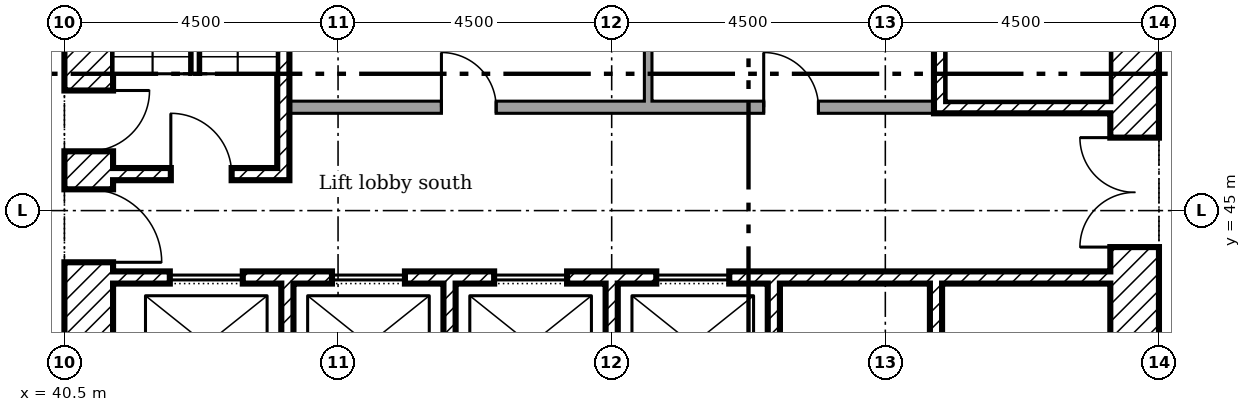
"""IFC4 building model, lengths in metres.
Left out: names, types, materials, properties, quantities, classifications, styles, units other than length and angle.
Written with IfcOpenShell. Run it as: python <this file> out.ifc"""

import sys

from ifc_helpers import new_model, si_unit, direction, frame, frame_2d, origin, place, context, subcontext, project, spatial, rectangle, extrude, element, fill, save


model = new_model("IFC4")
c1 = context("Model", 3, precision=1e-05, world=origin(), true_north=direction((0.0, 1.0)))
c2 = subcontext(c1, "Body", "Model", "MODEL_VIEW")
j1 = project(units=[si_unit("LENGTHUNIT", "METRE"), si_unit("PLANEANGLEUNIT", "RADIAN")], contexts=[c1])
p1 = place(None, origin())
s1 = spatial("IfcSite", under=j1, at=p1, CompositionType="ELEMENT")
p2 = place(p1, origin())
s2 = spatial("IfcBuilding", under=s1, at=p2, CompositionType="ELEMENT")
p3 = place(p2, frame((0.0, 0.0, 47.4)))
s3 = spatial("IfcBuildingStorey", under=s2, at=p3, CompositionType="ELEMENT", Elevation=47.4)
p4 = place(p3, frame((58.1, 40.5, 0.0), z_axis=(0.0, 0.0, 1.0), x_axis=(0.0, 1.0, 0.0)))
e1 = element("IfcWall", 1, at=p4, inside=s3, PredefinedType="SHEAR", context=c2, shape_type="SweptSolid", body=[
    extrude(rectangle(XDim=18.0, YDim=0.8, at=frame_2d((9.0, 0.0))), origin(), (0.0, 0.0, 1.0), 3.35),
])
p5 = place(p4, frame((13.15, 0.0, 0.0)))
e2 = element("IfcOpeningElement", 2, at=p5, cuts=e1, PredefinedType="OPENING", context=c2, shape_type="SweptSolid", body=[
    extrude(rectangle(XDim=1.2, YDim=2.1, at=frame_2d((0.6, 1.05))), frame((0.0, 0.41, 0.0), z_axis=(0.0, -1.0, 0.0), x_axis=(1.0, 0.0, 0.0)), (0.0, 0.0, 1.0), 0.82),
])
p6 = place(p4, frame((3.9, 0.0, 0.0)))
e3 = element("IfcOpeningElement", 3, at=p6, cuts=e1, PredefinedType="OPENING", context=c2, shape_type="SweptSolid", body=[
    extrude(rectangle(XDim=1.8, YDim=2.1, at=frame_2d((0.9, 1.05))), frame((0.0, 0.41, 0.0), z_axis=(0.0, -1.0, 0.0), x_axis=(1.0, 0.0, 0.0)), (0.0, 0.0, 1.0), 0.82),
])
p7 = place(p4, frame((11.525, 0.0, 0.0)))
e4 = element("IfcOpeningElement", 4, at=p7, cuts=e1, PredefinedType="OPENING", context=c2, shape_type="SweptSolid", body=[
    extrude(rectangle(XDim=1.0, YDim=2.1, at=frame_2d((0.5, 1.05))), frame((0.0, 0.41, 0.0), z_axis=(0.0, -1.0, 0.0), x_axis=(1.0, 0.0, 0.0)), (0.0, 0.0, 1.0), 0.82),
])
p8 = place(p3, frame((40.9, 40.5, 0.0), z_axis=(0.0, 0.0, 1.0), x_axis=(0.0, 1.0, 0.0)))
e5 = element("IfcWall", 5, at=p8, inside=s3, PredefinedType="SHEAR", context=c2, shape_type="SweptSolid", body=[
    extrude(rectangle(XDim=18.0, YDim=0.8, at=frame_2d((9.0, 0.0))), origin(), (0.0, 0.0, 1.0), 3.35),
])
p9 = place(p8, frame((3.65, 0.0, 0.0)))
e6 = element("IfcOpeningElement", 6, at=p9, cuts=e5, PredefinedType="OPENING", context=c2, shape_type="SweptSolid", body=[
    extrude(rectangle(XDim=1.2, YDim=2.1, at=frame_2d((0.6, 1.05))), frame((0.0, 0.41, 0.0), z_axis=(0.0, -1.0, 0.0), x_axis=(1.0, 0.0, 0.0)), (0.0, 0.0, 1.0), 0.82),
])
p10 = place(p8, frame((5.475, 0.0, 0.0)))
e7 = element("IfcOpeningElement", 7, at=p10, cuts=e5, PredefinedType="OPENING", context=c2, shape_type="SweptSolid", body=[
    extrude(rectangle(XDim=1.0, YDim=2.1, at=frame_2d((0.5, 1.05))), frame((0.0, 0.41, 0.0), z_axis=(0.0, -1.0, 0.0), x_axis=(1.0, 0.0, 0.0)), (0.0, 0.0, 1.0), 0.82),
])
p11 = place(p8, frame((12.3, 0.0, 0.0)))
e8 = element("IfcOpeningElement", 8, at=p11, cuts=e5, PredefinedType="OPENING", context=c2, shape_type="SweptSolid", body=[
    extrude(rectangle(XDim=1.0, YDim=2.1, at=frame_2d((0.5, 1.05))), frame((0.0, 0.41, 0.0), z_axis=(0.0, -1.0, 0.0), x_axis=(1.0, 0.0, 0.0)), (0.0, 0.0, 1.0), 0.82),
])
for number, where, z_axis, x_axis in (
    (9, (44.167, 41.3, 0.0), (0.0, 0.0, 1.0), (0.0, 1.0, 0.0)),
    (10, (46.833, 41.3, 0.0), (0.0, 0.0, 1.0), (0.0, 1.0, 0.0)),
    (11, (49.5, 41.3, 0.0), (0.0, 0.0, 1.0), (0.0, 1.0, 0.0)),
    (12, (52.167, 41.3, 0.0), (0.0, 0.0, 1.0), (0.0, 1.0, 0.0)),
    (13, (54.833, 41.3, 0.0), (0.0, 0.0, 1.0), (0.0, 1.0, 0.0)),
):
    element("IfcWall", number, at=place(p3, frame(where, z_axis=z_axis, x_axis=x_axis)), inside=s3, PredefinedType="SHEAR", context=c2, shape_type="SweptSolid", body=[
        extrude(rectangle(XDim=2.5, YDim=0.2, at=frame_2d((1.25, 0.0))), origin(), (0.0, 0.0, 1.0), 3.35),
    ])
p12 = place(p3, frame((41.3, 43.9, 0.0)))
e14 = element("IfcWall", 14, at=p12, inside=s3, PredefinedType="SHEAR", context=c2, shape_type="SweptSolid", body=[
    extrude(rectangle(XDim=16.4, YDim=0.2, at=frame_2d((8.2, 0.0))), origin(), (0.0, 0.0, 1.0), 3.35),
])
p13 = place(p12, frame((0.933, 0.0, 0.0)))
e15 = element("IfcOpeningElement", 15, at=p13, cuts=e14, PredefinedType="OPENING", context=c2, shape_type="SweptSolid", body=[
    extrude(rectangle(XDim=1.2, YDim=2.1, at=frame_2d((0.6, 1.05))), frame((0.0, 0.11, 0.0), z_axis=(0.0, -1.0, 0.0), x_axis=(1.0, 0.0, 0.0)), (0.0, 0.0, 1.0), 0.22),
])
p14 = place(p12, frame((3.6, 0.0, 0.0)))
e16 = element("IfcOpeningElement", 16, at=p14, cuts=e14, PredefinedType="OPENING", context=c2, shape_type="SweptSolid", body=[
    extrude(rectangle(XDim=1.2, YDim=2.1, at=frame_2d((0.6, 1.05))), frame((0.0, 0.11, 0.0), z_axis=(0.0, -1.0, 0.0), x_axis=(1.0, 0.0, 0.0)), (0.0, 0.0, 1.0), 0.22),
])
p15 = place(p12, frame((6.267, 0.0, 0.0)))
e17 = element("IfcOpeningElement", 17, at=p15, cuts=e14, PredefinedType="OPENING", context=c2, shape_type="SweptSolid", body=[
    extrude(rectangle(XDim=1.2, YDim=2.1, at=frame_2d((0.6, 1.05))), frame((0.0, 0.11, 0.0), z_axis=(0.0, -1.0, 0.0), x_axis=(1.0, 0.0, 0.0)), (0.0, 0.0, 1.0), 0.22),
])
p16 = place(p12, frame((8.933, 0.0, 0.0)))
e18 = element("IfcOpeningElement", 18, at=p16, cuts=e14, PredefinedType="OPENING", context=c2, shape_type="SweptSolid", body=[
    extrude(rectangle(XDim=1.2, YDim=2.1, at=frame_2d((0.6, 1.05))), frame((0.0, 0.11, 0.0), z_axis=(0.0, -1.0, 0.0), x_axis=(1.0, 0.0, 0.0)), (0.0, 0.0, 1.0), 0.22),
])
p17 = place(p3, frame((44.1, 45.5, 0.0), z_axis=(0.0, 0.0, 1.0), x_axis=(0.0, 1.0, 0.0)))
e19 = element("IfcWall", 19, at=p17, inside=s3, PredefinedType="SHEAR", context=c2, shape_type="SweptSolid", body=[
    extrude(rectangle(XDim=6.9, YDim=0.2, at=frame_2d((3.45, 0.0))), origin(), (0.0, 0.0, 1.0), 3.35),
])
p18 = place(p3, frame((41.3, 45.6, 0.0)))
e20 = element("IfcWall", 20, at=p18, inside=s3, PredefinedType="SHEAR", context=c2, shape_type="SweptSolid", body=[
    extrude(rectangle(XDim=2.7, YDim=0.2, at=frame_2d((1.35, 0.0))), origin(), (0.0, 0.0, 1.0), 3.35),
])
p19 = place(p18, frame((0.95, 0.0, 0.0)))
e21 = element("IfcOpeningElement", 21, at=p19, cuts=e20, PredefinedType="OPENING", context=c2, shape_type="SweptSolid", body=[
    extrude(rectangle(XDim=1.0, YDim=2.1, at=frame_2d((0.5, 1.05))), frame((0.0, 0.11, 0.0), z_axis=(0.0, -1.0, 0.0), x_axis=(1.0, 0.0, 0.0)), (0.0, 0.0, 1.0), 0.22),
])
p20 = place(p3, frame((54.8, 46.7, 0.0)))
e22 = element("IfcWall", 22, at=p20, inside=s3, PredefinedType="SHEAR", context=c2, shape_type="SweptSolid", body=[
    extrude(rectangle(XDim=2.9, YDim=0.2, at=frame_2d((1.45, 0.0))), origin(), (0.0, 0.0, 1.0), 3.35),
])
p21 = place(p3, frame((54.9, 46.8, 0.0), z_axis=(0.0, 0.0, 1.0), x_axis=(0.0, 1.0, 0.0)))
e23 = element("IfcWall", 23, at=p21, inside=s3, PredefinedType="SHEAR", context=c2, shape_type="SweptSolid", body=[
    extrude(rectangle(XDim=6.5, YDim=0.2, at=frame_2d((3.25, 0.0))), origin(), (0.0, 0.0, 1.0), 3.35),
])
p22 = place(p3, frame((44.2, 46.7, 0.0)))
e24 = element("IfcWall", 24, at=p22, inside=s3, PredefinedType="PARTITIONING", context=c2, shape_type="SweptSolid", body=[
    extrude(rectangle(XDim=10.6, YDim=0.2, at=frame_2d((5.3, 0.0))), origin(), (0.0, 0.0, 1.0), 3.35),
])
p23 = place(p22, frame((2.5, 0.0, 0.0)))
e25 = element("IfcOpeningElement", 25, at=p23, cuts=e24, PredefinedType="OPENING", context=c2, shape_type="SweptSolid", body=[
    extrude(rectangle(XDim=0.9, YDim=2.1, at=frame_2d((0.45, 1.05))), frame((0.0, 0.11, 0.0), z_axis=(0.0, -1.0, 0.0), x_axis=(1.0, 0.0, 0.0)), (0.0, 0.0, 1.0), 0.22),
])
p24 = place(p22, frame((7.8, 0.0, 0.0)))
e26 = element("IfcOpeningElement", 26, at=p24, cuts=e24, PredefinedType="OPENING", context=c2, shape_type="SweptSolid", body=[
    extrude(rectangle(XDim=0.9, YDim=2.1, at=frame_2d((0.45, 1.05))), frame((0.0, 0.11, 0.0), z_axis=(0.0, -1.0, 0.0), x_axis=(1.0, 0.0, 0.0)), (0.0, 0.0, 1.0), 0.22),
])
p25 = place(p3, frame((50.1, 46.8, 0.0), z_axis=(0.0, 0.0, 1.0), x_axis=(0.0, 1.0, 0.0)))
e27 = element("IfcWall", 27, at=p25, inside=s3, PredefinedType="PARTITIONING", context=c2, shape_type="SweptSolid", body=[
    extrude(rectangle(XDim=1.962, YDim=0.125, at=frame_2d((0.981, 0.0))), origin(), (0.0, 0.0, 1.0), 3.35),
])
p26 = place(p6, origin())
e28 = element("IfcDoor", 28, at=p26, inside=s3, OperationType="DOUBLE_DOOR_SINGLE_SWING", PredefinedType="DOOR", context=c2, shape_type="SweptSolid", body=[
    extrude(rectangle(XDim=1.8, YDim=2.1, at=frame_2d((0.9, 1.05))), frame((0.0, 0.025, 0.0), z_axis=(0.0, -1.0, 0.0), x_axis=(1.0, 0.0, 0.0)), (0.0, 0.0, 1.0), 0.05),
])
fill(e3, e28)
p27 = place(p9, frame((1.2, 0.0, 0.0), x_axis=(-1.0, 0.0, 0.0)))
e29 = element("IfcDoor", 29, at=p27, inside=s3, OperationType="SINGLE_SWING_LEFT", PredefinedType="DOOR", context=c2, shape_type="SweptSolid", body=[
    extrude(rectangle(XDim=1.2, YDim=2.1, at=frame_2d((0.6, 1.05))), frame((0.0, 0.025, 0.0), z_axis=(0.0, -1.0, 0.0), x_axis=(1.0, 0.0, 0.0)), (0.0, 0.0, 1.0), 0.05),
])
fill(e6, e29)
p28 = place(p19, origin())
e30 = element("IfcDoor", 30, at=p28, inside=s3, OperationType="SINGLE_SWING_RIGHT", PredefinedType="DOOR", context=c2, shape_type="SweptSolid", body=[
    extrude(rectangle(XDim=1.0, YDim=2.1, at=frame_2d((0.5, 1.05))), frame((0.0, 0.025, 0.0), z_axis=(0.0, -1.0, 0.0), x_axis=(1.0, 0.0, 0.0)), (0.0, 0.0, 1.0), 0.05),
])
fill(e21, e30)
p29 = place(p10, frame((1.0, 0.0, 0.0), x_axis=(-1.0, 0.0, 0.0)))
e31 = element("IfcDoor", 31, at=p29, inside=s3, OperationType="SINGLE_SWING_RIGHT", PredefinedType="DOOR", context=c2, shape_type="SweptSolid", body=[
    extrude(rectangle(XDim=1.0, YDim=2.1, at=frame_2d((0.5, 1.05))), frame((0.0, 0.025, 0.0), z_axis=(0.0, -1.0, 0.0), x_axis=(1.0, 0.0, 0.0)), (0.0, 0.0, 1.0), 0.05),
])
fill(e7, e31)
p30 = place(p23, origin())
e32 = element("IfcDoor", 32, at=p30, inside=s3, OperationType="SINGLE_SWING_RIGHT", PredefinedType="DOOR", context=c2, shape_type="SweptSolid", body=[
    extrude(rectangle(XDim=0.9, YDim=2.1, at=frame_2d((0.45, 1.05))), frame((0.0, 0.025, 0.0), z_axis=(0.0, -1.0, 0.0), x_axis=(1.0, 0.0, 0.0)), (0.0, 0.0, 1.0), 0.05),
])
fill(e25, e32)
p31 = place(p24, origin())
e33 = element("IfcDoor", 33, at=p31, inside=s3, OperationType="SINGLE_SWING_RIGHT", PredefinedType="DOOR", context=c2, shape_type="SweptSolid", body=[
    extrude(rectangle(XDim=0.9, YDim=2.1, at=frame_2d((0.45, 1.05))), frame((0.0, 0.025, 0.0), z_axis=(0.0, -1.0, 0.0), x_axis=(1.0, 0.0, 0.0)), (0.0, 0.0, 1.0), 0.05),
])
fill(e26, e33)
p32 = place(p13, origin())
e34 = element("IfcDoor", 34, at=p32, inside=s3, OperationType="SLIDING_TO_LEFT", PredefinedType="DOOR", context=c2, shape_type="SweptSolid", body=[
    extrude(rectangle(XDim=1.2, YDim=2.1, at=frame_2d((0.6, 1.05))), frame((0.0, 0.025, 0.0), z_axis=(0.0, -1.0, 0.0), x_axis=(1.0, 0.0, 0.0)), (0.0, 0.0, 1.0), 0.05),
])
fill(e15, e34)
p33 = place(p14, origin())
e35 = element("IfcDoor", 35, at=p33, inside=s3, OperationType="SLIDING_TO_LEFT", PredefinedType="DOOR", context=c2, shape_type="SweptSolid", body=[
    extrude(rectangle(XDim=1.2, YDim=2.1, at=frame_2d((0.6, 1.05))), frame((0.0, 0.025, 0.0), z_axis=(0.0, -1.0, 0.0), x_axis=(1.0, 0.0, 0.0)), (0.0, 0.0, 1.0), 0.05),
])
fill(e16, e35)
p34 = place(p15, origin())
e36 = element("IfcDoor", 36, at=p34, inside=s3, OperationType="SLIDING_TO_LEFT", PredefinedType="DOOR", context=c2, shape_type="SweptSolid", body=[
    extrude(rectangle(XDim=1.2, YDim=2.1, at=frame_2d((0.6, 1.05))), frame((0.0, 0.025, 0.0), z_axis=(0.0, -1.0, 0.0), x_axis=(1.0, 0.0, 0.0)), (0.0, 0.0, 1.0), 0.05),
])
fill(e17, e36)
p35 = place(p16, origin())
e37 = element("IfcDoor", 37, at=p35, inside=s3, OperationType="SLIDING_TO_LEFT", PredefinedType="DOOR", context=c2, shape_type="SweptSolid", body=[
    extrude(rectangle(XDim=1.2, YDim=2.1, at=frame_2d((0.6, 1.05))), frame((0.0, 0.025, 0.0), z_axis=(0.0, -1.0, 0.0), x_axis=(1.0, 0.0, 0.0)), (0.0, 0.0, 1.0), 0.05),
])
fill(e18, e37)
save(model, sys.argv[1])
